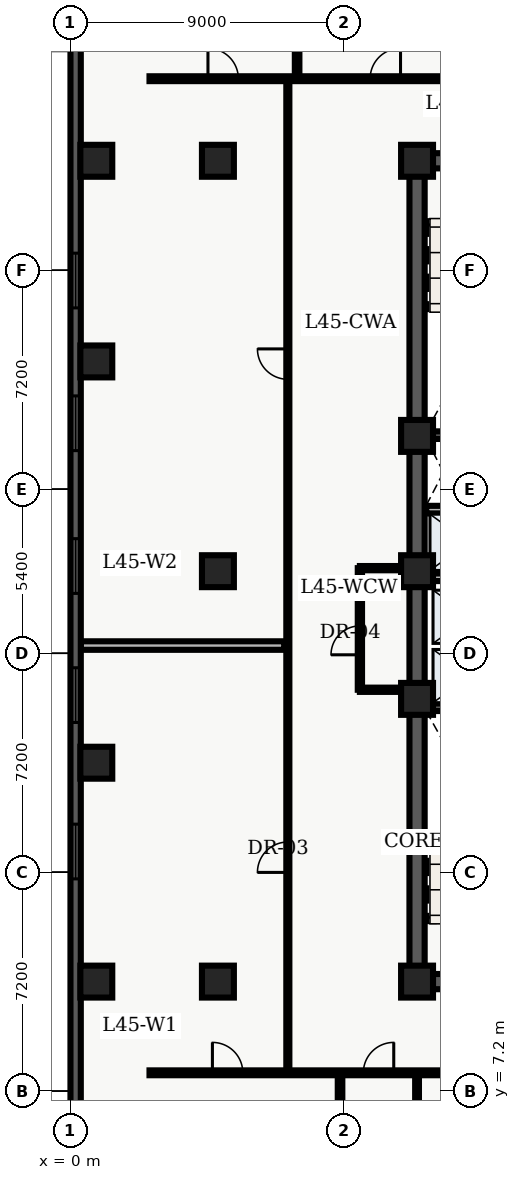
"""IFC4 building model, lengths in metres.
Left out: names, types, materials, properties, quantities, classifications, styles, units other than length and angle.
Written with IfcOpenShell. Run it as: python <this file> out.ifc"""

import sys

from ifc_helpers import new_model, entity, si_unit, converted_unit, direction, frame, origin_with_axes, origin_2d_with_axis, place, context, subcontext, project, spatial, polyline, rectangle, outline, extrude, element, fill, save


model = new_model("IFC4")
c1 = context("Model", 3, precision=1e-05, world=origin_with_axes(), true_north=direction((0.0, 1.0)))
c2 = subcontext(c1, "Body", "Model", "MODEL_VIEW")
j1 = project(units=[si_unit("LENGTHUNIT", "METRE"), converted_unit("PLANEANGLEUNIT", "DEGREE", entity("IfcPlaneAngleMeasure", 0.017), si_unit("PLANEANGLEUNIT", "RADIAN"), dimensions=[0, 0, 0, 0, 0, 0, 0])], contexts=[c1])
p1 = place(None, origin_with_axes())
s1 = spatial("IfcSite", under=j1, at=p1, CompositionType="ELEMENT")
p2 = place(p1, origin_with_axes())
s2 = spatial("IfcBuilding", under=s1, at=p2, CompositionType="ELEMENT")
p3 = place(p2, frame((0.0, 0.0, 183.6), z_axis=(0.0, 0.0, 1.0), x_axis=(1.0, 0.0, 0.0)))
s3 = spatial("IfcBuildingStorey", under=s2, at=p3, CompositionType="ELEMENT", Elevation=183.6)
p4 = place(p3, frame((11.4, 10.8, 0.0), z_axis=(0.0, 0.0, 1.0), x_axis=(0.0, 1.0, 0.0)))
e1 = element("IfcWall", 1, at=p4, inside=s3, PredefinedType="SHEAR", context=c2, shape_type="SweptSolid", body=[
    extrude(outline(polyline([(0.0, -0.25), (27.0, -0.25), (27.0, 0.25), (0.0, 0.25), (0.0, -0.25)])), origin_with_axes(), (0.0, 0.0, 1.0), 3.6),
])
p5 = place(p3, frame((11.4, 10.8, 0.0), z_axis=(0.0, 0.0, 1.0), x_axis=(1.0, 0.0, 0.0)))
e2 = element("IfcWall", 2, at=p5, inside=s3, PredefinedType="SHEAR", context=c2, shape_type="SweptSolid", body=[
    extrude(outline(polyline([(0.0, -0.25), (7.2, -0.25), (7.2, 0.25), (0.0, 0.25), (0.0, -0.25)])), origin_with_axes(), (0.0, 0.0, 1.0), 3.6),
])
p6 = place(p5, frame((2.625, 0.0, 0.0), z_axis=(0.0, 0.0, 1.0), x_axis=(1.0, 0.0, 0.0)))
e3 = element("IfcOpeningElement", 3, at=p6, cuts=e2, PredefinedType="OPENING", context=c2, shape_type="SweptSolid", body=[
    extrude(rectangle(XDim=1.05, YDim=0.52, at=origin_2d_with_axis()), origin_with_axes(), (0.0, 0.0, 1.0), 2.15),
])
p7 = place(p3, frame((11.4, 37.8, 0.0), z_axis=(0.0, 0.0, 1.0), x_axis=(1.0, 0.0, 0.0)))
e4 = element("IfcWall", 4, at=p7, inside=s3, PredefinedType="SHEAR", context=c2, shape_type="SweptSolid", body=[
    extrude(outline(polyline([(0.0, -0.25), (7.2, -0.25), (7.2, 0.25), (0.0, 0.25), (0.0, -0.25)])), origin_with_axes(), (0.0, 0.0, 1.0), 3.6),
])
p8 = place(p7, frame((2.625, 0.0, 0.0), z_axis=(0.0, 0.0, 1.0), x_axis=(1.0, 0.0, 0.0)))
e5 = element("IfcOpeningElement", 5, at=p8, cuts=e4, PredefinedType="OPENING", context=c2, shape_type="SweptSolid", body=[
    extrude(rectangle(XDim=1.05, YDim=0.52, at=origin_2d_with_axis()), origin_with_axes(), (0.0, 0.0, 1.0), 2.15),
])
for number, where, z_axis, x_axis in (
    (6, (11.65, 19.825, 0.0), (0.0, 0.0, 1.0), (1.0, 0.0, 0.0)),
    (7, (11.65, 28.775, 0.0), (0.0, 0.0, 1.0), (1.0, 0.0, 0.0)),
):
    element("IfcWall", number, at=place(p3, frame(where, z_axis=z_axis, x_axis=x_axis)), inside=s3, PredefinedType="SHEAR", context=c2, shape_type="SweptSolid", body=[
        extrude(outline(polyline([(0.0, -0.125), (6.7, -0.125), (6.7, 0.125), (0.0, 0.125), (0.0, -0.125)])), origin_with_axes(), (0.0, 0.0, 1.0), 3.6),
    ])
p9 = place(p3, frame((11.7, 24.1, 0.0), z_axis=(0.0, 0.0, 1.0), x_axis=(1.0, 0.0, 0.0)))
e8 = element("IfcWall", 8, at=p9, inside=s3, PredefinedType="SOLIDWALL", context=c2, shape_type="SweptSolid", body=[
    extrude(outline(polyline([(0.0, -0.125), (6.6, -0.125), (6.6, 0.125), (0.0, 0.125), (0.0, -0.125)])), origin_with_axes(), (0.0, 0.0, 1.0), 2.64),
])
p10 = place(p9, frame((3.75, 0.0, 0.0), z_axis=(0.0, 0.0, 1.0), x_axis=(1.0, 0.0, 0.0)))
e9 = element("IfcOpeningElement", 9, at=p10, cuts=e8, PredefinedType="OPENING", context=c2, shape_type="SweptSolid", body=[
    extrude(rectangle(XDim=0.9, YDim=0.27, at=origin_2d_with_axis()), origin_with_axes(), (0.0, 0.0, 1.0), 2.15),
])
p11 = place(p3, frame((11.7, 26.325, 0.0), z_axis=(0.0, 0.0, 1.0), x_axis=(1.0, 0.0, 0.0)))
e10 = element("IfcWall", 10, at=p11, inside=s3, PredefinedType="SOLIDWALL", context=c2, shape_type="SweptSolid", body=[
    extrude(outline(polyline([(0.0, -0.125), (6.6, -0.125), (6.6, 0.125), (0.0, 0.125), (0.0, -0.125)])), origin_with_axes(), (0.0, 0.0, 1.0), 2.64),
])
p12 = place(p11, frame((3.5, 0.0, 0.0), z_axis=(0.0, 0.0, 1.0), x_axis=(1.0, 0.0, 0.0)))
e11 = element("IfcOpeningElement", 11, at=p12, cuts=e10, PredefinedType="OPENING", context=c2, shape_type="SweptSolid", body=[
    extrude(rectangle(XDim=0.9, YDim=0.27, at=origin_2d_with_axis()), origin_with_axes(), (0.0, 0.0, 1.0), 2.15),
])
for number, where, z_axis, x_axis in (
    (12, (11.4, 10.8, 0.0), (0.0, 0.0, 1.0), (1.0, 0.0, 0.0)),
    (13, (11.4, 20.1, 0.0), (0.0, 0.0, 1.0), (1.0, 0.0, 0.0)),
    (14, (11.4, 24.3, 0.0), (0.0, 0.0, 1.0), (1.0, 0.0, 0.0)),
    (15, (11.4, 28.75, 0.0), (0.0, 0.0, 1.0), (1.0, 0.0, 0.0)),
    (16, (11.4, 37.8, 0.0), (0.0, 0.0, 1.0), (1.0, 0.0, 0.0)),
    (17, (4.85, 10.8, 0.0), (0.0, 0.0, 1.0), (1.0, 0.0, 0.0)),
    (18, (4.85, 24.3, 0.0), (0.0, 0.0, 1.0), (1.0, 0.0, 0.0)),
    (19, (4.85, 37.8, 0.0), (0.0, 0.0, 1.0), (1.0, 0.0, 0.0)),
    (20, (0.85, 10.8, 0.0), (0.0, 0.0, 1.0), (1.0, 0.0, 0.0)),
    (21, (0.85, 18.0, 0.0), (0.0, 0.0, 1.0), (1.0, 0.0, 0.0)),
    (22, (0.85, 31.2, 0.0), (0.0, 0.0, 1.0), (1.0, 0.0, 0.0)),
    (23, (0.85, 37.8, 0.0), (0.0, 0.0, 1.0), (1.0, 0.0, 0.0)),
):
    element("IfcColumn", number, at=place(p3, frame(where, z_axis=z_axis, x_axis=x_axis)), inside=s3, PredefinedType="COLUMN", context=c2, shape_type="SweptSolid", body=[
        extrude(rectangle(XDim=1.05, YDim=1.05, at=origin_2d_with_axis()), origin_with_axes(), (0.0, 0.0, 1.0), 3.9),
    ])
p13 = place(p3, frame((9.52, 20.4, 0.0), z_axis=(0.0, 0.0, 1.0), x_axis=(0.0, 1.0, 0.0)))
e24 = element("IfcWall", 24, at=p13, inside=s3, PredefinedType="PARTITIONING", context=c2, shape_type="SweptSolid", body=[
    extrude(outline(polyline([(0.0, -0.07), (4.0, -0.07), (4.0, 0.07), (0.0, 0.07), (0.0, -0.07)])), origin_with_axes(), (0.0, 0.0, 1.0), 2.64),
])
p14 = place(p13, frame((1.625, 0.0, 0.0), z_axis=(0.0, 0.0, 1.0), x_axis=(1.0, 0.0, 0.0)))
e25 = element("IfcOpeningElement", 25, at=p14, cuts=e24, PredefinedType="OPENING", context=c2, shape_type="SweptSolid", body=[
    extrude(rectangle(XDim=0.95, YDim=0.16, at=origin_2d_with_axis()), origin_with_axes(), (0.0, 0.0, 1.0), 2.15),
])
for number, where, z_axis, x_axis in (
    (26, (9.52, 20.4, 0.0), (0.0, 0.0, 1.0), (1.0, 0.0, 0.0)),
    (27, (9.52, 24.4, 0.0), (0.0, 0.0, 1.0), (1.0, 0.0, 0.0)),
):
    element("IfcWall", number, at=place(p3, frame(where, z_axis=z_axis, x_axis=x_axis)), inside=s3, PredefinedType="PARTITIONING", context=c2, shape_type="SweptSolid", body=[
        extrude(outline(polyline([(0.0, -0.07), (1.58, -0.07), (1.58, 0.07), (0.0, 0.07), (0.0, -0.07)])), origin_with_axes(), (0.0, 0.0, 1.0), 2.64),
    ])
p15 = place(p3, frame((2.6, 7.8, 0.0), z_axis=(0.0, 0.0, 1.0), x_axis=(1.0, 0.0, 0.0)))
e28 = element("IfcWall", 28, at=p15, inside=s3, PredefinedType="PARTITIONING", context=c2, shape_type="SweptSolid", body=[
    extrude(outline(polyline([(0.0, -0.08), (18.55, -0.08), (18.55, 0.08), (0.0, 0.08), (0.0, -0.08)])), origin_with_axes(), (0.0, 0.0, 1.0), 2.64),
])
p16 = place(p15, frame((2.569, 0.0, 0.0), z_axis=(0.0, 0.0, 1.0), x_axis=(1.0, 0.0, 0.0)))
e29 = element("IfcOpeningElement", 29, at=p16, cuts=e28, PredefinedType="OPENING", context=c2, shape_type="SweptSolid", body=[
    extrude(rectangle(XDim=1.0, YDim=0.18, at=origin_2d_with_axis()), origin_with_axes(), (0.0, 0.0, 1.0), 2.15),
])
p17 = place(p15, frame((7.534, 0.0, 0.0), z_axis=(0.0, 0.0, 1.0), x_axis=(1.0, 0.0, 0.0)))
e30 = element("IfcOpeningElement", 30, at=p17, cuts=e28, PredefinedType="OPENING", context=c2, shape_type="SweptSolid", body=[
    extrude(rectangle(XDim=1.0, YDim=0.18, at=origin_2d_with_axis()), origin_with_axes(), (0.0, 0.0, 1.0), 2.15),
])
p18 = place(p15, frame((11.293, 0.0, 0.0), z_axis=(0.0, 0.0, 1.0), x_axis=(1.0, 0.0, 0.0)))
e31 = element("IfcOpeningElement", 31, at=p18, cuts=e28, PredefinedType="OPENING", context=c2, shape_type="SweptSolid", body=[
    extrude(rectangle(XDim=1.0, YDim=0.18, at=origin_2d_with_axis()), origin_with_axes(), (0.0, 0.0, 1.0), 2.15),
])
p19 = place(p15, frame((16.142, 0.0, 0.0), z_axis=(0.0, 0.0, 1.0), x_axis=(1.0, 0.0, 0.0)))
e32 = element("IfcOpeningElement", 32, at=p19, cuts=e28, PredefinedType="OPENING", context=c2, shape_type="SweptSolid", body=[
    extrude(rectangle(XDim=1.0, YDim=0.18, at=origin_2d_with_axis()), origin_with_axes(), (0.0, 0.0, 1.0), 2.15),
])
p20 = place(p3, frame((2.6, 40.5, 0.0), z_axis=(0.0, 0.0, 1.0), x_axis=(1.0, 0.0, 0.0)))
e33 = element("IfcWall", 33, at=p20, inside=s3, PredefinedType="PARTITIONING", context=c2, shape_type="SweptSolid", body=[
    extrude(outline(polyline([(0.0, -0.08), (23.459, -0.08), (23.459, 0.08), (0.0, 0.08), (0.0, -0.08)])), origin_with_axes(), (0.0, 0.0, 1.0), 2.64),
])
p21 = place(p20, frame((2.422, 0.0, 0.0), z_axis=(0.0, 0.0, 1.0), x_axis=(1.0, 0.0, 0.0)))
e34 = element("IfcOpeningElement", 34, at=p21, cuts=e33, PredefinedType="OPENING", context=c2, shape_type="SweptSolid", body=[
    extrude(rectangle(XDim=1.0, YDim=0.18, at=origin_2d_with_axis()), origin_with_axes(), (0.0, 0.0, 1.0), 2.15),
])
p22 = place(p20, frame((7.756, 0.0, 0.0), z_axis=(0.0, 0.0, 1.0), x_axis=(1.0, 0.0, 0.0)))
e35 = element("IfcOpeningElement", 35, at=p22, cuts=e33, PredefinedType="OPENING", context=c2, shape_type="SweptSolid", body=[
    extrude(rectangle(XDim=1.0, YDim=0.18, at=origin_2d_with_axis()), origin_with_axes(), (0.0, 0.0, 1.0), 2.15),
])
p23 = place(p20, frame((14.089, 0.0, 0.0), z_axis=(0.0, 0.0, 1.0), x_axis=(1.0, 0.0, 0.0)))
e36 = element("IfcOpeningElement", 36, at=p23, cuts=e33, PredefinedType="OPENING", context=c2, shape_type="SweptSolid", body=[
    extrude(rectangle(XDim=1.2, YDim=0.18, at=origin_2d_with_axis()), origin_with_axes(), (0.0, 0.0, 1.0), 2.2),
])
p24 = place(p3, frame((7.15, 7.8, 0.0), z_axis=(0.0, 0.0, 1.0), x_axis=(0.0, 1.0, 0.0)))
e37 = element("IfcWall", 37, at=p24, inside=s3, PredefinedType="PARTITIONING", context=c2, shape_type="SweptSolid", body=[
    extrude(outline(polyline([(0.0, -0.05), (32.7, -0.05), (32.7, 0.05), (0.0, 0.05), (0.0, -0.05)])), origin_with_axes(), (0.0, 0.0, 1.0), 2.64),
])
p25 = place(p24, frame((7.092, 0.0, 0.0), z_axis=(0.0, 0.0, 1.0), x_axis=(1.0, 0.0, 0.0)))
e38 = element("IfcOpeningElement", 38, at=p25, cuts=e37, PredefinedType="OPENING", context=c2, shape_type="SweptSolid", body=[
    extrude(rectangle(XDim=1.0, YDim=0.12, at=origin_2d_with_axis()), origin_with_axes(), (0.0, 0.0, 1.0), 2.15),
])
p26 = place(p24, frame((23.312, 0.0, 0.0), z_axis=(0.0, 0.0, 1.0), x_axis=(1.0, 0.0, 0.0)))
e39 = element("IfcOpeningElement", 39, at=p26, cuts=e37, PredefinedType="OPENING", context=c2, shape_type="SweptSolid", body=[
    extrude(rectangle(XDim=1.0, YDim=0.12, at=origin_2d_with_axis()), origin_with_axes(), (0.0, 0.0, 1.0), 2.15),
])
p27 = place(p3, frame((0.335, 21.854, 0.0), z_axis=(0.0, 0.0, 1.0), x_axis=(1.0, 0.0, 0.0)))
e40 = element("IfcWall", 40, at=p27, inside=s3, PredefinedType="PARTITIONING", context=c2, shape_type="SweptSolid", body=[
    extrude(outline(polyline([(0.0, -0.14), (6.695, -0.14), (6.695, 0.14), (0.0, 0.14), (0.0, -0.14)])), origin_with_axes(), (0.0, 0.0, 1.0), 2.64),
])
p28 = place(p3, frame((8.867, 0.335, 0.0), z_axis=(0.0, 0.0, 1.0), x_axis=(0.0, 1.0, 0.0)))
e41 = element("IfcWall", 41, at=p28, inside=s3, PredefinedType="PARTITIONING", context=c2, shape_type="SweptSolid", body=[
    extrude(outline(polyline([(0.0, -0.075), (7.365, -0.075), (7.365, 0.075), (0.0, 0.075), (0.0, -0.075)])), origin_with_axes(), (0.0, 0.0, 1.0), 2.64),
])
p29 = place(p3, frame((11.4, 0.335, 0.0), z_axis=(0.0, 0.0, 1.0), x_axis=(0.0, 1.0, 0.0)))
e42 = element("IfcWall", 42, at=p29, inside=s3, PredefinedType="PARTITIONING", context=c2, shape_type="SweptSolid", body=[
    extrude(outline(polyline([(0.0, -0.062), (7.365, -0.062), (7.365, 0.062), (0.0, 0.062), (0.0, -0.062)])), origin_with_axes(), (0.0, 0.0, 1.0), 2.64),
])
p30 = place(p3, frame((7.455, 40.6, 0.0), z_axis=(0.0, 0.0, 1.0), x_axis=(0.0, 1.0, 0.0)))
e43 = element("IfcWall", 43, at=p30, inside=s3, PredefinedType="PARTITIONING", context=c2, shape_type="SweptSolid", body=[
    extrude(outline(polyline([(0.0, -0.075), (7.665, -0.075), (7.665, 0.075), (0.0, 0.075), (0.0, -0.075)])), origin_with_axes(), (0.0, 0.0, 1.0), 2.64),
])
p31 = place(p3, frame((0.17, 2.74, 0.0), z_axis=(0.0, 0.0, 1.0), x_axis=(0.0, 1.0, 0.0)))
e44 = element("IfcWall", 44, at=p31, inside=s3, PredefinedType="SOLIDWALL", context=c2, shape_type="SweptSolid", body=[
    extrude(outline(polyline([(0.0, -0.17), (43.46, -0.17), (43.46, 0.17), (0.0, 0.17), (0.0, -0.17)])), origin_with_axes(), (0.0, 0.0, 1.0), 3.6),
])
p32 = place(p31, frame((2.948, 0.0, 0.45), z_axis=(0.0, 0.0, 1.0), x_axis=(1.0, 0.0, 0.0)))
e45 = element("IfcOpeningElement", 45, at=p32, cuts=e44, PredefinedType="OPENING", context=c2, shape_type="SweptSolid", body=[
    extrude(rectangle(XDim=1.8, YDim=0.36, at=origin_2d_with_axis()), origin_with_axes(), (0.0, 0.0, 1.0), 2.1),
])
p33 = place(p31, frame((12.339, 0.0, 0.45), z_axis=(0.0, 0.0, 1.0), x_axis=(1.0, 0.0, 0.0)))
e46 = element("IfcOpeningElement", 46, at=p33, cuts=e44, PredefinedType="OPENING", context=c2, shape_type="SweptSolid", body=[
    extrude(rectangle(XDim=1.8, YDim=0.36, at=origin_2d_with_axis()), origin_with_axes(), (0.0, 0.0, 1.0), 2.1),
])
p34 = place(p31, frame((17.484, 0.0, 0.45), z_axis=(0.0, 0.0, 1.0), x_axis=(1.0, 0.0, 0.0)))
e47 = element("IfcOpeningElement", 47, at=p34, cuts=e44, PredefinedType="OPENING", context=c2, shape_type="SweptSolid", body=[
    extrude(rectangle(XDim=1.8, YDim=0.36, at=origin_2d_with_axis()), origin_with_axes(), (0.0, 0.0, 1.0), 2.1),
])
p35 = place(p31, frame((21.73, 0.0, 0.45), z_axis=(0.0, 0.0, 1.0), x_axis=(1.0, 0.0, 0.0)))
e48 = element("IfcOpeningElement", 48, at=p35, cuts=e44, PredefinedType="OPENING", context=c2, shape_type="SweptSolid", body=[
    extrude(rectangle(XDim=1.8, YDim=0.36, at=origin_2d_with_axis()), origin_with_axes(), (0.0, 0.0, 1.0), 2.1),
])
p36 = place(p31, frame((26.426, 0.0, 0.45), z_axis=(0.0, 0.0, 1.0), x_axis=(1.0, 0.0, 0.0)))
e49 = element("IfcOpeningElement", 49, at=p36, cuts=e44, PredefinedType="OPENING", context=c2, shape_type="SweptSolid", body=[
    extrude(rectangle(XDim=1.8, YDim=0.36, at=origin_2d_with_axis()), origin_with_axes(), (0.0, 0.0, 1.0), 2.1),
])
p37 = place(p31, frame((31.121, 0.0, 0.45), z_axis=(0.0, 0.0, 1.0), x_axis=(1.0, 0.0, 0.0)))
e50 = element("IfcOpeningElement", 50, at=p37, cuts=e44, PredefinedType="OPENING", context=c2, shape_type="SweptSolid", body=[
    extrude(rectangle(XDim=1.8, YDim=0.36, at=origin_2d_with_axis()), origin_with_axes(), (0.0, 0.0, 1.0), 2.1),
])
p38 = place(p31, frame((40.062, 0.0, 0.45), z_axis=(0.0, 0.0, 1.0), x_axis=(1.0, 0.0, 0.0)))
e51 = element("IfcOpeningElement", 51, at=p38, cuts=e44, PredefinedType="OPENING", context=c2, shape_type="SweptSolid", body=[
    extrude(rectangle(XDim=1.8, YDim=0.36, at=origin_2d_with_axis()), origin_with_axes(), (0.0, 0.0, 1.0), 2.1),
])
p39 = place(p13, frame((1.625, 0.0, 0.0), z_axis=(0.0, 0.0, 1.0), x_axis=(1.0, 0.0, 0.0)))
e52 = element("IfcDoor", 52, at=p39, inside=s3, OperationType="SINGLE_SWING_LEFT", PredefinedType="DOOR", context=c2, shape_type="SweptSolid", body=[
    extrude(rectangle(XDim=0.95, YDim=0.084, at=origin_2d_with_axis()), origin_with_axes(), (0.0, 0.0, 1.0), 2.15),
])
fill(e25, e52)
p40 = place(p24, frame((7.092, 0.0, 0.0), z_axis=(0.0, 0.0, 1.0), x_axis=(1.0, 0.0, 0.0)))
e53 = element("IfcDoor", 53, at=p40, inside=s3, OperationType="SINGLE_SWING_LEFT", PredefinedType="DOOR", context=c2, shape_type="SweptSolid", body=[
    extrude(rectangle(XDim=1.0, YDim=0.06, at=origin_2d_with_axis()), origin_with_axes(), (0.0, 0.0, 1.0), 2.15),
])
fill(e38, e53)
p41 = place(p24, frame((23.312, 0.0, 0.0), z_axis=(0.0, 0.0, 1.0), x_axis=(1.0, 0.0, 0.0)))
e54 = element("IfcDoor", 54, at=p41, inside=s3, OperationType="SINGLE_SWING_RIGHT", PredefinedType="DOOR", context=c2, shape_type="SweptSolid", body=[
    extrude(rectangle(XDim=1.0, YDim=0.06, at=origin_2d_with_axis()), origin_with_axes(), (0.0, 0.0, 1.0), 2.15),
])
fill(e39, e54)
p42 = place(p15, frame((2.569, 0.0, 0.0), z_axis=(0.0, 0.0, 1.0), x_axis=(1.0, 0.0, 0.0)))
e55 = element("IfcDoor", 55, at=p42, inside=s3, OperationType="SINGLE_SWING_LEFT", PredefinedType="DOOR", context=c2, shape_type="SweptSolid", body=[
    extrude(rectangle(XDim=1.0, YDim=0.09, at=origin_2d_with_axis()), origin_with_axes(), (0.0, 0.0, 1.0), 2.15),
])
fill(e29, e55)
p43 = place(p15, frame((7.534, 0.0, 0.0), z_axis=(0.0, 0.0, 1.0), x_axis=(1.0, 0.0, 0.0)))
e56 = element("IfcDoor", 56, at=p43, inside=s3, OperationType="SINGLE_SWING_RIGHT", PredefinedType="DOOR", context=c2, shape_type="SweptSolid", body=[
    extrude(rectangle(XDim=1.0, YDim=0.09, at=origin_2d_with_axis()), origin_with_axes(), (0.0, 0.0, 1.0), 2.15),
])
fill(e30, e56)
p44 = place(p20, frame((2.422, 0.0, 0.0), z_axis=(0.0, 0.0, 1.0), x_axis=(1.0, 0.0, 0.0)))
e57 = element("IfcDoor", 57, at=p44, inside=s3, OperationType="SINGLE_SWING_LEFT", PredefinedType="DOOR", context=c2, shape_type="SweptSolid", body=[
    extrude(rectangle(XDim=1.0, YDim=0.09, at=origin_2d_with_axis()), origin_with_axes(), (0.0, 0.0, 1.0), 2.15),
])
fill(e34, e57)
p45 = place(p20, frame((7.756, 0.0, 0.0), z_axis=(0.0, 0.0, 1.0), x_axis=(1.0, 0.0, 0.0)))
e58 = element("IfcDoor", 58, at=p45, inside=s3, OperationType="SINGLE_SWING_RIGHT", PredefinedType="DOOR", context=c2, shape_type="SweptSolid", body=[
    extrude(rectangle(XDim=1.0, YDim=0.09, at=origin_2d_with_axis()), origin_with_axes(), (0.0, 0.0, 1.0), 2.15),
])
fill(e35, e58)
p46 = place(p31, frame((12.339, 0.0, 0.45), z_axis=(0.0, 0.0, 1.0), x_axis=(1.0, 0.0, 0.0)))
e59 = element("IfcWindow", 59, at=p46, inside=s3, PredefinedType="WINDOW", context=c2, shape_type="SweptSolid", body=[
    extrude(rectangle(XDim=1.8, YDim=0.09, at=origin_2d_with_axis()), origin_with_axes(), (0.0, 0.0, 1.0), 2.1),
])
fill(e46, e59)
p47 = place(p31, frame((17.484, 0.0, 0.45), z_axis=(0.0, 0.0, 1.0), x_axis=(1.0, 0.0, 0.0)))
e60 = element("IfcWindow", 60, at=p47, inside=s3, PredefinedType="WINDOW", context=c2, shape_type="SweptSolid", body=[
    extrude(rectangle(XDim=1.8, YDim=0.09, at=origin_2d_with_axis()), origin_with_axes(), (0.0, 0.0, 1.0), 2.1),
])
fill(e47, e60)
p48 = place(p31, frame((21.73, 0.0, 0.45), z_axis=(0.0, 0.0, 1.0), x_axis=(1.0, 0.0, 0.0)))
e61 = element("IfcWindow", 61, at=p48, inside=s3, PredefinedType="WINDOW", context=c2, shape_type="SweptSolid", body=[
    extrude(rectangle(XDim=1.8, YDim=0.09, at=origin_2d_with_axis()), origin_with_axes(), (0.0, 0.0, 1.0), 2.1),
])
fill(e48, e61)
p49 = place(p31, frame((26.426, 0.0, 0.45), z_axis=(0.0, 0.0, 1.0), x_axis=(1.0, 0.0, 0.0)))
e62 = element("IfcWindow", 62, at=p49, inside=s3, PredefinedType="WINDOW", context=c2, shape_type="SweptSolid", body=[
    extrude(rectangle(XDim=1.8, YDim=0.09, at=origin_2d_with_axis()), origin_with_axes(), (0.0, 0.0, 1.0), 2.1),
])
fill(e49, e62)
p50 = place(p31, frame((31.121, 0.0, 0.45), z_axis=(0.0, 0.0, 1.0), x_axis=(1.0, 0.0, 0.0)))
e63 = element("IfcWindow", 63, at=p50, inside=s3, PredefinedType="WINDOW", context=c2, shape_type="SweptSolid", body=[
    extrude(rectangle(XDim=1.8, YDim=0.09, at=origin_2d_with_axis()), origin_with_axes(), (0.0, 0.0, 1.0), 2.1),
])
fill(e50, e63)
save(model, sys.argv[1])
